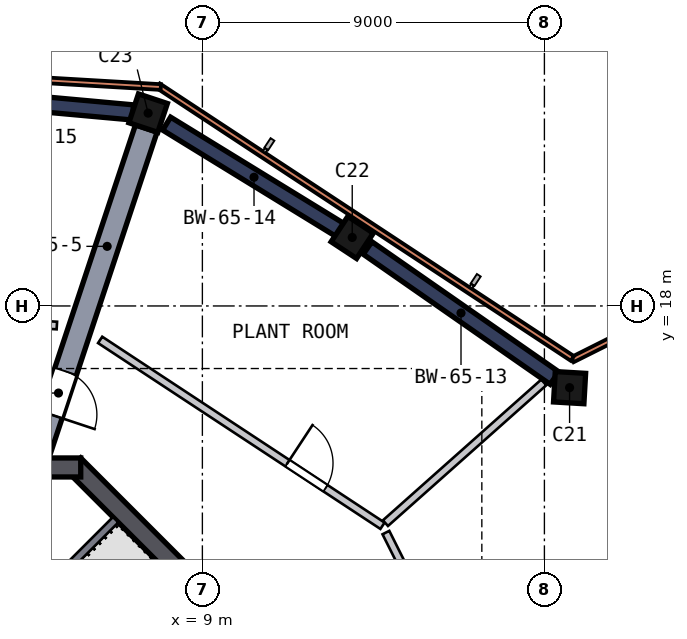
"""IFC4 building model, lengths in metres.
Left out: names, types, materials, properties, quantities, classifications, styles, units other than length and angle.
Written with IfcOpenShell. Run it as: python <this file> out.ifc"""

import sys

from ifc_helpers import new_model, si_unit, direction, frame, frame_2d, origin, origin_2d, place, context, subcontext, project, spatial, rectangle, extrude, element, fill, save


model = new_model("IFC4")
c1 = context("Model", 3, precision=1e-05, world=origin(), true_north=direction((0.0, 1.0)))
c2 = subcontext(c1, "Body", "Model", "MODEL_VIEW")
j1 = project(units=[si_unit("LENGTHUNIT", "METRE"), si_unit("PLANEANGLEUNIT", "RADIAN")], contexts=[c1])
p1 = place(None, origin())
s1 = spatial("IfcSite", under=j1, at=p1, CompositionType="ELEMENT")
p2 = place(p1, origin())
s2 = spatial("IfcBuilding", under=s1, at=p2, CompositionType="ELEMENT")
p3 = place(p2, frame((0.0, 0.0, 263.0)))
s3 = spatial("IfcBuildingStorey", under=s2, at=p3, CompositionType="ELEMENT", Elevation=263.0)
p4 = place(p3, frame((18.716, 15.788, 0.0), z_axis=(-0.044438242, 0.05179951, 0.997668308), x_axis=(0.997291806, -0.056281729, 0.047343652)))
e1 = element("IfcColumn", 1, at=p4, inside=s3, PredefinedType="COLUMN", context=c2, shape_type="SweptSolid", body=[
    extrude(rectangle(XDim=0.8, YDim=0.8, at=origin_2d()), origin(), (0.0, 0.0, 1.0), 4.51),
])
p5 = place(p3, frame((13.01, 19.76, 0.0), z_axis=(-0.055380526, 0.035783507, 0.997823901), x_axis=(-0.833509154, 0.548557504, -0.065932963)))
e2 = element("IfcColumn", 2, at=p5, inside=s3, PredefinedType="COLUMN", context=c2, shape_type="SweptSolid", body=[
    extrude(rectangle(XDim=0.8, YDim=0.8, at=origin_2d()), origin(), (0.0, 0.0, 1.0), 4.51),
])
p6 = place(p3, frame((7.65, 23.05, 0.0), z_axis=(-0.064359674, 0.020785631, 0.997710274), x_axis=(0.946810023, -0.314605933, 0.067630523)))
e3 = element("IfcColumn", 3, at=p6, inside=s3, PredefinedType="COLUMN", context=c2, shape_type="SweptSolid", body=[
    extrude(rectangle(XDim=0.8, YDim=0.8, at=origin_2d()), origin(), (0.0, 0.0, 1.0), 4.51),
])
p7 = place(p3, frame((13.823, 5.622, 0.0), z_axis=(0.0, 0.0, 1.0), x_axis=(-0.707106781, 0.707106781, 0.0)))
e4 = element("IfcWall", 4, at=p7, inside=s3, PredefinedType="SHEAR", context=c2, shape_type="SweptSolid", body=[
    extrude(rectangle(XDim=11.598, YDim=0.5, at=frame_2d((5.799, 0.0))), origin(), (0.0, 0.0, 1.0), 6.0),
])
p8 = place(p7, frame((2.099, 0.0, 0.0)))
e5 = element("IfcOpeningElement", 5, at=p8, cuts=e4, PredefinedType="OPENING", context=c2, shape_type="SweptSolid", body=[
    extrude(rectangle(XDim=1.2, YDim=2.1, at=frame_2d((0.6, 1.05))), frame((0.0, 0.26, 0.0), z_axis=(0.0, -1.0, 0.0), x_axis=(1.0, 0.0, 0.0)), (0.0, 0.0, 1.0), 0.52),
])
p9 = place(p3, frame((5.799, 13.75, 0.0), z_axis=(0.0, 0.0, 1.0), x_axis=(-1.0, 0.0, 0.0)))
e6 = element("IfcWall", 6, at=p9, inside=s3, PredefinedType="SHEAR", context=c2, shape_type="SweptSolid", body=[
    extrude(rectangle(XDim=11.598, YDim=0.5, at=frame_2d((5.799, 0.0))), origin(), (0.0, 0.0, 1.0), 6.0),
])
p10 = place(p9, frame((4.899, 0.0, 0.0)))
e7 = element("IfcOpeningElement", 7, at=p10, cuts=e6, PredefinedType="OPENING", context=c2, shape_type="SweptSolid", body=[
    extrude(rectangle(XDim=1.8, YDim=2.1, at=frame_2d((0.9, 1.05))), frame((0.0, 0.26, 0.0), z_axis=(0.0, -1.0, 0.0), x_axis=(1.0, 0.0, 0.0)), (0.0, 0.0, 1.0), 0.52),
])
p11 = place(p3, frame((18.264, 16.102, 0.0), z_axis=(0.0, 0.0, 1.0), x_axis=(-0.820712508, 0.571341386, 0.0)))
e8 = element("IfcWall", 8, at=p11, inside=s3, PredefinedType="SHEAR", context=c2, shape_type="SweptSolid", body=[
    extrude(rectangle(XDim=5.993, YDim=0.4, at=frame_2d((2.996, 0.0))), origin(), (0.0, 0.0, 1.0), 4.5),
])
p12 = place(p3, frame((12.658, 19.976, 0.0), z_axis=(0.0, 0.0, 1.0), x_axis=(-0.852324104, 0.523013979, 0.0)))
e9 = element("IfcWall", 9, at=p12, inside=s3, PredefinedType="SHEAR", context=c2, shape_type="SweptSolid", body=[
    extrude(rectangle(XDim=5.396, YDim=0.4, at=frame_2d((2.698, 0.0))), origin(), (0.0, 0.0, 1.0), 4.5),
])
p13 = place(p3, frame((7.171, 23.093, 0.0), z_axis=(0.0, 0.0, 1.0), x_axis=(-0.99591321, 0.090315437, 0.0)))
e10 = element("IfcWall", 10, at=p13, inside=s3, PredefinedType="SHEAR", context=c2, shape_type="SweptSolid", body=[
    extrude(rectangle(XDim=5.396, YDim=0.4, at=frame_2d((2.698, 0.0))), origin(), (0.0, 0.0, 1.0), 4.5),
])
p14 = place(p3, frame((4.583, 13.81, 0.0), z_axis=(0.0, 0.0, 1.0), x_axis=(0.314995658, 0.949093112, 0.0)))
e11 = element("IfcWall", 11, at=p14, inside=s3, PredefinedType="SHEAR", context=c2, shape_type="SweptSolid", body=[
    extrude(rectangle(XDim=9.335, YDim=0.6, at=frame_2d((4.667, 0.0))), origin(), (0.0, 0.0, 1.0), 4.5),
])
p15 = place(p14, frame((1.4, 0.0, 0.0)))
e12 = element("IfcOpeningElement", 12, at=p15, cuts=e11, PredefinedType="OPENING", context=c2, shape_type="SweptSolid", body=[
    extrude(rectangle(XDim=1.2, YDim=2.1, at=frame_2d((0.6, 1.05))), frame((0.0, 0.31, 0.0), z_axis=(0.0, -1.0, 0.0), x_axis=(1.0, 0.0, 0.0)), (0.0, 0.0, 1.0), 0.62),
])
p16 = place(p3, frame((25.046, 19.752, 0.0), z_axis=(0.0, 0.0, 1.0), x_axis=(-0.893845478, -0.448375134, 0.0)))
e13 = element("IfcWall", 13, at=p16, inside=s3, PredefinedType="SOLIDWALL", context=c2, shape_type="SweptSolid", body=[
    extrude(rectangle(XDim=7.06, YDim=0.15, at=frame_2d((3.53, 0.0))), origin(), (0.0, 0.0, 1.0), 4.5),
])
p17 = place(p3, frame((18.737, 16.618, 0.0), z_axis=(0.0, 0.0, 1.0), x_axis=(-0.835226418, 0.549906202, 0.0)))
e14 = element("IfcWall", 14, at=p17, inside=s3, PredefinedType="SOLIDWALL", context=c2, shape_type="SweptSolid", body=[
    extrude(rectangle(XDim=13.046, YDim=0.15, at=frame_2d((6.523, 0.0))), origin(), (0.0, 0.0, 1.0), 4.5),
])
p18 = place(p3, frame((7.906, 23.761, 0.0), z_axis=(0.0, 0.0, 1.0), x_axis=(-0.998281212, 0.058605638, 0.0)))
e15 = element("IfcWall", 15, at=p18, inside=s3, PredefinedType="SOLIDWALL", context=c2, shape_type="SweptSolid", body=[
    extrude(rectangle(XDim=13.035, YDim=0.15, at=frame_2d((6.518, 0.0))), origin(), (0.0, 0.0, 1.0), 4.5),
])
p19 = place(p3, frame((3.677, 9.334, 0.0), z_axis=(0.0, 0.0, 1.0), x_axis=(0.707078393, 0.707135168, 0.0)))
e16 = element("IfcWall", 16, at=p19, inside=s3, PredefinedType="SOLIDWALL", context=c2, shape_type="SweptSolid", body=[
    extrude(rectangle(XDim=4.3, YDim=0.2, at=frame_2d((2.15, 0.0))), origin(), (0.0, 0.0, 1.0), 5.55),
])
p20 = place(p3, frame((-3.089, 17.97, 0.0), z_axis=(0.0, 0.0, 1.0), x_axis=(0.998281387, -0.058602667, 0.0)))
e17 = element("IfcWall", 17, at=p20, inside=s3, PredefinedType="SOLIDWALL", context=c2, shape_type="SweptSolid", body=[
    extrude(rectangle(XDim=8.274, YDim=0.2, at=frame_2d((4.137, 0.0))), origin(), (0.0, 0.0, 1.0), 4.5),
])
p21 = place(p20, frame((0.2, 0.0, 0.0)))
e18 = element("IfcOpeningElement", 18, at=p21, cuts=e17, PredefinedType="OPENING", context=c2, shape_type="SweptSolid", body=[
    extrude(rectangle(XDim=1.2, YDim=2.1, at=frame_2d((0.6, 1.05))), frame((0.0, 0.11, 0.0), z_axis=(0.0, -1.0, 0.0), x_axis=(1.0, 0.0, 0.0)), (0.0, 0.0, 1.0), 0.22),
])
p22 = place(p3, frame((6.31, 17.107, 0.0), z_axis=(0.0, 0.0, 1.0), x_axis=(0.835228667, -0.549902786, 0.0)))
e19 = element("IfcWall", 19, at=p22, inside=s3, PredefinedType="SOLIDWALL", context=c2, shape_type="SweptSolid", body=[
    extrude(rectangle(XDim=8.896, YDim=0.2, at=frame_2d((4.448, 0.0))), origin(), (0.0, 0.0, 1.0), 4.5),
])
p23 = place(p22, frame((5.9, 0.0, 0.0)))
e20 = element("IfcOpeningElement", 20, at=p23, cuts=e19, PredefinedType="OPENING", context=c2, shape_type="SweptSolid", body=[
    extrude(rectangle(XDim=1.2, YDim=2.1, at=frame_2d((0.6, 1.05))), frame((0.0, 0.11, 0.0), z_axis=(0.0, -1.0, 0.0), x_axis=(1.0, 0.0, 0.0)), (0.0, 0.0, 1.0), 0.22),
])
p24 = place(p3, frame((13.817, 12.285, 0.0), z_axis=(0.0, 0.0, 1.0), x_axis=(0.747356168, 0.664423629, 0.0)))
e21 = element("IfcWall", 21, at=p24, inside=s3, PredefinedType="SOLIDWALL", context=c2, shape_type="SweptSolid", body=[
    extrude(rectangle(XDim=5.576, YDim=0.2, at=frame_2d((2.788, 0.0))), origin(), (0.0, 0.0, 1.0), 4.5),
])
p25 = place(p3, frame((13.829, 12.037, 0.0), z_axis=(0.0, 0.0, 1.0), x_axis=(0.448376743, -0.893844671, 0.0)))
e22 = element("IfcWall", 22, at=p25, inside=s3, PredefinedType="SOLIDWALL", context=c2, shape_type="SweptSolid", body=[
    extrude(rectangle(XDim=9.316, YDim=0.2, at=frame_2d((4.658, 0.0))), origin(), (0.0, 0.0, 1.0), 4.5),
])
p26 = place(p25, frame((3.95, 0.0, 0.0)))
e23 = element("IfcOpeningElement", 23, at=p26, cuts=e22, PredefinedType="OPENING", context=c2, shape_type="SweptSolid", body=[
    extrude(rectangle(XDim=1.2, YDim=2.1, at=frame_2d((0.6, 1.05))), frame((0.0, 0.11, 0.0), z_axis=(0.0, -1.0, 0.0), x_axis=(1.0, 0.0, 0.0)), (0.0, 0.0, 1.0), 0.22),
])
p27 = place(p15, origin())
e24 = element("IfcDoor", 24, at=p27, inside=s3, OperationType="SINGLE_SWING_LEFT", PredefinedType="DOOR", context=c2, shape_type="SweptSolid", body=[
    extrude(rectangle(XDim=1.2, YDim=2.1, at=frame_2d((0.6, 1.05))), frame((0.0, 0.025, 0.0), z_axis=(0.0, -1.0, 0.0), x_axis=(1.0, 0.0, 0.0)), (0.0, 0.0, 1.0), 0.05),
])
fill(e12, e24)
p28 = place(p23, origin())
e25 = element("IfcDoor", 25, at=p28, inside=s3, OperationType="SINGLE_SWING_LEFT", PredefinedType="DOOR", context=c2, shape_type="SweptSolid", body=[
    extrude(rectangle(XDim=1.2, YDim=2.1, at=frame_2d((0.6, 1.05))), frame((0.0, 0.025, 0.0), z_axis=(0.0, -1.0, 0.0), x_axis=(1.0, 0.0, 0.0)), (0.0, 0.0, 1.0), 0.05),
])
fill(e20, e25)
save(model, sys.argv[1])
